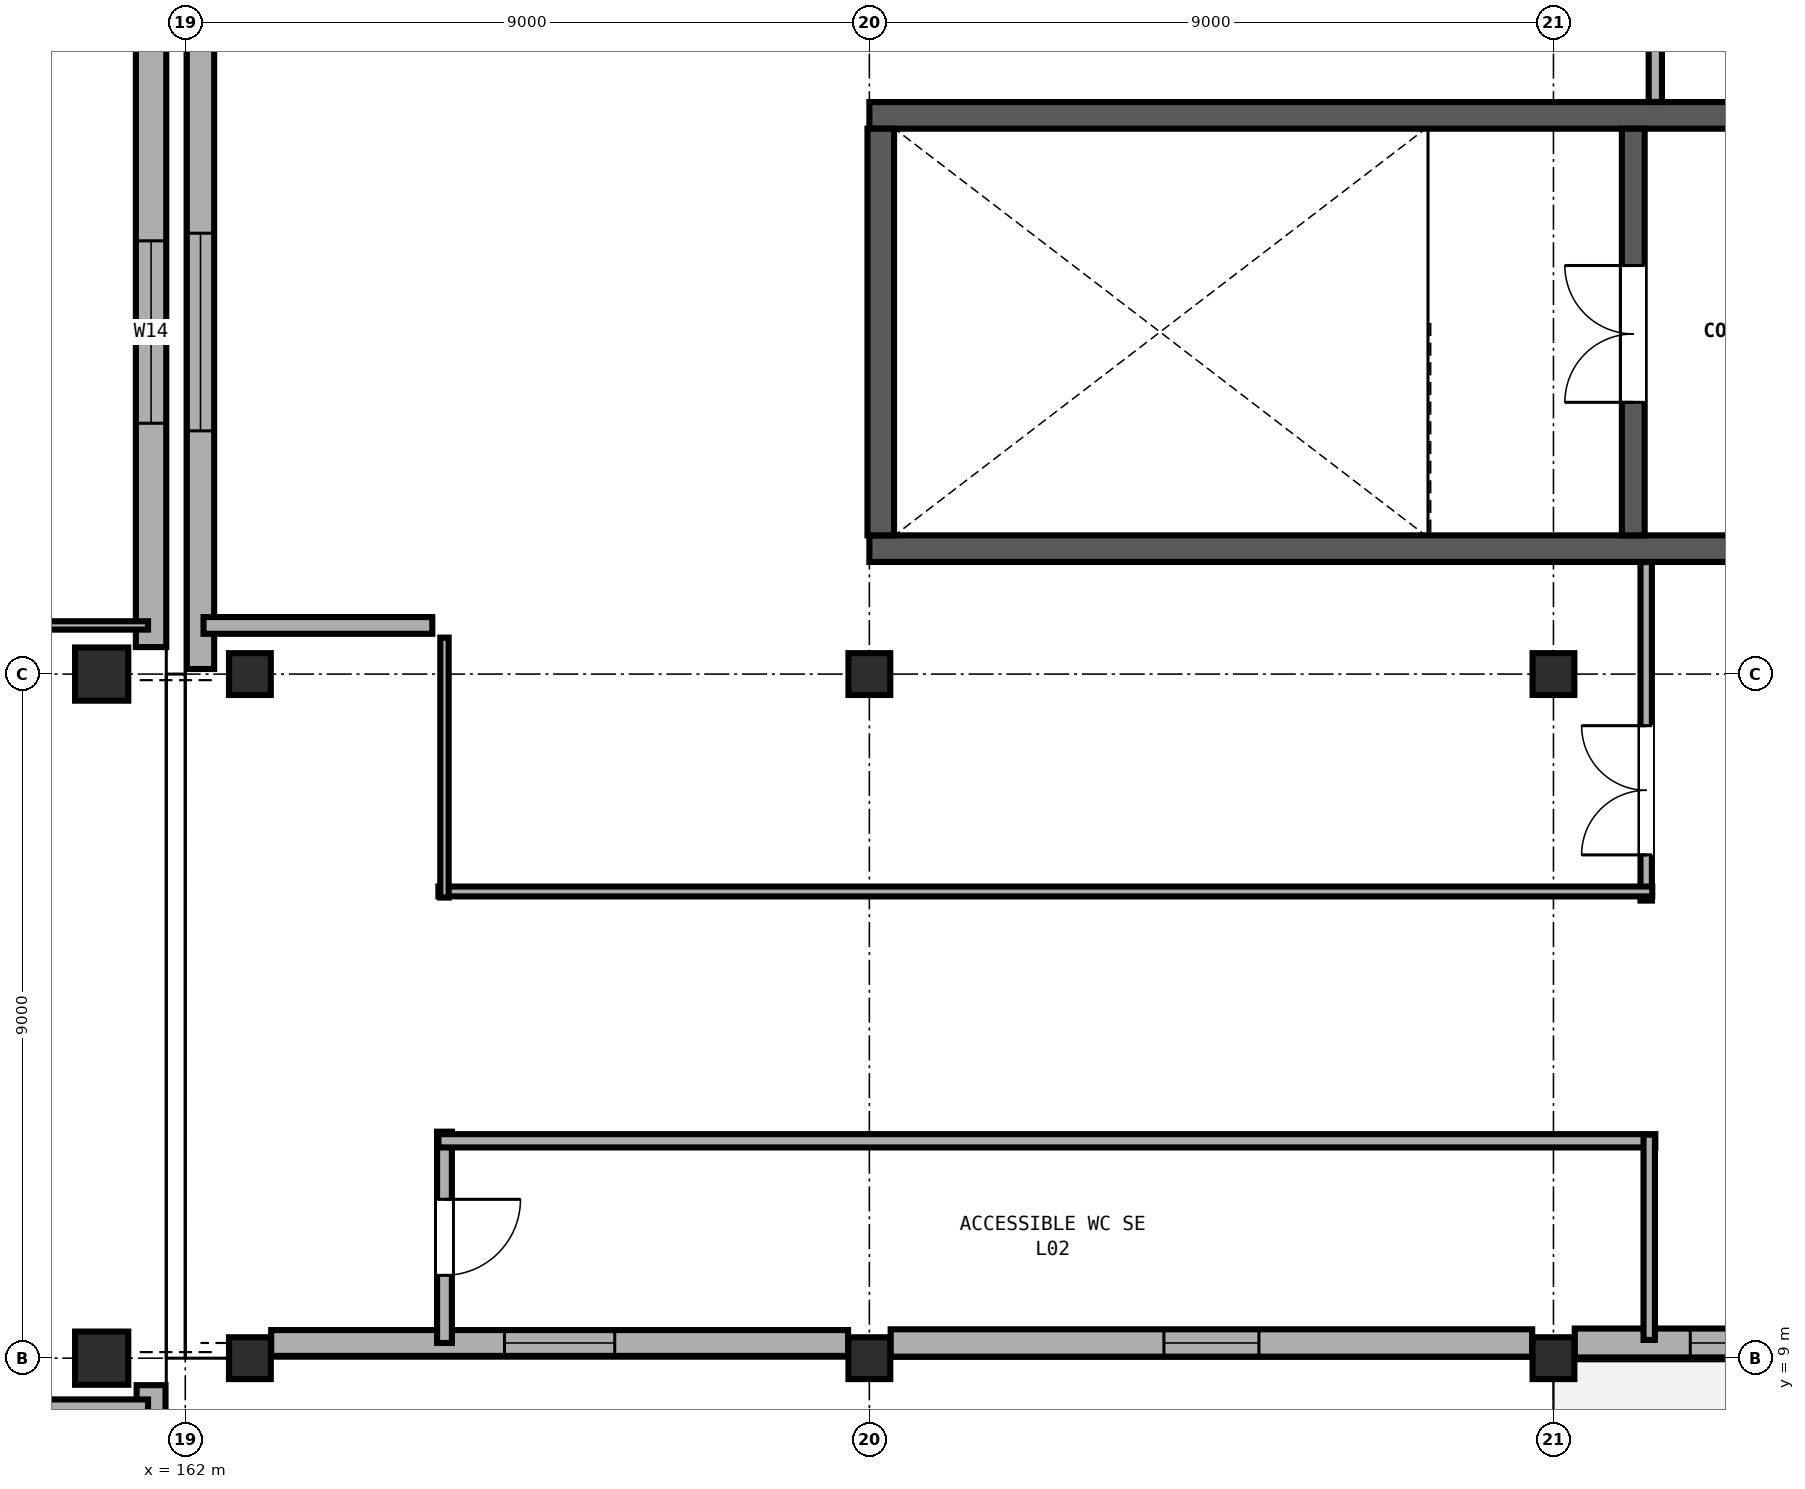
"""IFC4 building model, lengths in metres.
Left out: names, types, materials, properties, quantities, classifications, styles, units other than length and angle.
Written with IfcOpenShell. Run it as: python <this file> out.ifc"""

import sys

from ifc_helpers import new_model, si_unit, direction, frame, frame_2d, origin, origin_2d, place, context, subcontext, project, spatial, rectangle, extrude, element, fill, save


model = new_model("IFC4")
c1 = context("Model", 3, precision=1e-05, world=origin(), true_north=direction((0.0, 1.0)))
c2 = subcontext(c1, "Body", "Model", "MODEL_VIEW")
j1 = project(units=[si_unit("LENGTHUNIT", "METRE"), si_unit("PLANEANGLEUNIT", "RADIAN")], contexts=[c1])
p1 = place(None, origin())
s1 = spatial("IfcSite", under=j1, at=p1, CompositionType="ELEMENT")
p2 = place(p1, origin())
s2 = spatial("IfcBuilding", under=s1, at=p2, CompositionType="ELEMENT")
p3 = place(p2, frame((0.0, 0.0, 9.6)))
s3 = spatial("IfcBuildingStorey", under=s2, at=p3, CompositionType="ELEMENT", Elevation=9.6)
for number, where, z_axis, x_axis in (
    (1, (160.9, 9.0, 0.0), (0.0, 0.0, 1.0), (1.0, 0.0, 0.0)),
    (2, (160.9, 18.0, 0.0), (0.0, 0.0, 1.0), (1.0, 0.0, 0.0)),
):
    element("IfcColumn", number, at=place(p3, frame(where, z_axis=z_axis, x_axis=x_axis)), inside=s3, PredefinedType="COLUMN", context=c2, shape_type="SweptSolid", body=[
        extrude(rectangle(XDim=0.7, YDim=0.7, at=origin_2d()), origin(), (0.0, 0.0, 1.0), 4.8),
    ])
for number, where, z_axis, x_axis in (
    (3, (162.85, 9.0, 0.0), (0.0, 0.0, 1.0), (1.0, 0.0, 0.0)),
    (4, (162.85, 18.0, 0.0), (0.0, 0.0, 1.0), (1.0, 0.0, 0.0)),
    (5, (171.0, 9.0, 0.0), (0.0, 0.0, 1.0), (1.0, 0.0, 0.0)),
    (6, (171.0, 18.0, 0.0), (0.0, 0.0, 1.0), (1.0, 0.0, 0.0)),
    (7, (180.0, 9.0, 0.0), (0.0, 0.0, 1.0), (1.0, 0.0, 0.0)),
    (8, (180.0, 18.0, 0.0), (0.0, 0.0, 1.0), (1.0, 0.0, 0.0)),
):
    element("IfcColumn", number, at=place(p3, frame(where, z_axis=z_axis, x_axis=x_axis)), inside=s3, PredefinedType="COLUMN", context=c2, shape_type="SweptSolid", body=[
        extrude(rectangle(XDim=0.55, YDim=0.55, at=origin_2d()), origin(), (0.0, 0.0, 1.0), 4.8),
    ])
p4 = place(p3, frame((171.0, 19.65, 0.0), z_axis=(0.0, 0.0, 1.0), x_axis=(1.0, 0.0, 0.0)))
e9 = element("IfcWall", 9, at=p4, inside=s3, PredefinedType="SHEAR", context=c2, shape_type="SweptSolid", body=[
    extrude(rectangle(XDim=18.0, YDim=0.35, at=frame_2d((9.0, 0.0))), origin(), (0.0, 0.0, 1.0), 4.555),
])
p5 = place(p4, frame((11.4, 0.0, 0.0)))
e10 = element("IfcOpeningElement", 10, at=p5, cuts=e9, PredefinedType="OPENING", context=c2, shape_type="SweptSolid", body=[
    extrude(rectangle(XDim=1.9, YDim=2.25, at=frame_2d((0.95, 1.125))), frame((0.0, 0.185, 0.0), z_axis=(0.0, -1.0, 0.0), x_axis=(1.0, 0.0, 0.0)), (0.0, 0.0, 1.0), 0.37),
])
p6 = place(p3, frame((189.0, 25.35, 0.0), z_axis=(0.0, 0.0, 1.0), x_axis=(-1.0, 0.0, 0.0)))
e11 = element("IfcWall", 11, at=p6, inside=s3, PredefinedType="SHEAR", context=c2, shape_type="SweptSolid", body=[
    extrude(rectangle(XDim=18.0, YDim=0.35, at=frame_2d((9.0, 0.0))), origin(), (0.0, 0.0, 1.0), 4.555),
])
p7 = place(p3, frame((171.15, 25.175, 0.0), z_axis=(0.0, 0.0, 1.0), x_axis=(0.0, -1.0, 0.0)))
e12 = element("IfcWall", 12, at=p7, inside=s3, PredefinedType="SHEAR", context=c2, shape_type="SweptSolid", body=[
    extrude(rectangle(XDim=5.35, YDim=0.35, at=frame_2d((2.675, 0.0))), origin(), (0.0, 0.0, 1.0), 4.555),
])
p8 = place(p3, frame((181.05, 19.825, 0.0), z_axis=(0.0, 0.0, 1.0), x_axis=(0.0, 1.0, 0.0)))
e13 = element("IfcWall", 13, at=p8, inside=s3, PredefinedType="SHEAR", context=c2, shape_type="SweptSolid", body=[
    extrude(rectangle(XDim=5.35, YDim=0.3, at=frame_2d((2.675, 0.0))), origin(), (0.0, 0.0, 1.0), 4.555),
])
p9 = place(p8, frame((1.75, 0.0, 0.0)))
e14 = element("IfcOpeningElement", 14, at=p9, cuts=e13, PredefinedType="OPENING", context=c2, shape_type="SweptSolid", body=[
    extrude(rectangle(XDim=1.8, YDim=2.25, at=frame_2d((0.9, 1.125))), frame((0.0, 0.16, 0.0), z_axis=(0.0, -1.0, 0.0), x_axis=(1.0, 0.0, 0.0)), (0.0, 0.0, 1.0), 0.32),
])
p10 = place(p3, frame((161.55, 26.645, 0.0), z_axis=(0.0, 0.0, 1.0), x_axis=(0.0, -1.0, 0.0)))
e15 = element("IfcWall", 15, at=p10, inside=s3, PredefinedType="SOLIDWALL", context=c2, shape_type="SweptSolid", body=[
    extrude(rectangle(XDim=8.29, YDim=0.4, at=frame_2d((4.145, 0.0))), origin(), (0.0, 0.0, 1.0), 3.58),
])
p11 = place(p10, frame((2.945, 0.0, 0.9)))
e16 = element("IfcOpeningElement", 16, at=p11, cuts=e15, PredefinedType="OPENING", context=c2, shape_type="SweptSolid", body=[
    extrude(rectangle(XDim=2.4, YDim=2.05, at=frame_2d((1.2, 1.025))), frame((0.0, 0.21, 0.0), z_axis=(0.0, -1.0, 0.0), x_axis=(1.0, 0.0, 0.0)), (0.0, 0.0, 1.0), 0.42),
])
p12 = place(p3, frame((161.55, 8.645, 0.0), z_axis=(0.0, 0.0, 1.0), x_axis=(0.0, -1.0, 0.0)))
e17 = element("IfcWall", 17, at=p12, inside=s3, PredefinedType="SOLIDWALL", context=c2, shape_type="SweptSolid", body=[
    extrude(rectangle(XDim=1.645, YDim=0.38, at=frame_2d((0.823, 0.0))), origin(), (0.0, 0.0, 1.0), 3.58),
])
p13 = place(p3, frame((162.2, 18.067, 0.0), z_axis=(0.0, 0.0, 1.0), x_axis=(0.0, 1.0, 0.0)))
e18 = element("IfcWall", 18, at=p13, inside=s3, PredefinedType="SOLIDWALL", context=c2, shape_type="SweptSolid", body=[
    extrude(rectangle(XDim=8.867, YDim=0.36, at=frame_2d((4.433, 0.0))), origin(), (0.0, 0.0, 1.0), 3.58),
])
p14 = place(p13, frame((3.133, 0.0, 0.9)))
e19 = element("IfcOpeningElement", 19, at=p14, cuts=e18, PredefinedType="OPENING", context=c2, shape_type="SweptSolid", body=[
    extrude(rectangle(XDim=2.6, YDim=2.15, at=frame_2d((1.3, 1.075))), frame((0.0, 0.19, 0.0), z_axis=(0.0, -1.0, 0.0), x_axis=(1.0, 0.0, 0.0)), (0.0, 0.0, 1.0), 0.38),
])
p15 = place(p3, frame((188.72, 9.2, 0.0), z_axis=(0.0, 0.0, 1.0), x_axis=(-1.0, 0.0, 0.0)))
e20 = element("IfcWall", 20, at=p15, inside=s3, PredefinedType="SOLIDWALL", context=c2, shape_type="SweptSolid", body=[
    extrude(rectangle(XDim=8.44, YDim=0.38, at=frame_2d((4.22, 0.0))), origin(), (0.0, 0.0, 1.0), 3.58),
])
p16 = place(p15, frame((3.52, 0.0, 0.9)))
e21 = element("IfcOpeningElement", 21, at=p16, cuts=e20, PredefinedType="OPENING", context=c2, shape_type="SweptSolid", body=[
    extrude(rectangle(XDim=3.4, YDim=1.95, at=frame_2d((1.7, 0.975))), frame((0.0, 0.2, 0.0), z_axis=(0.0, -1.0, 0.0), x_axis=(1.0, 0.0, 0.0)), (0.0, 0.0, 1.0), 0.4),
])
p17 = place(p3, frame((179.72, 9.2, 0.0), z_axis=(0.0, 0.0, 1.0), x_axis=(-1.0, 0.0, 0.0)))
e22 = element("IfcWall", 22, at=p17, inside=s3, PredefinedType="SOLIDWALL", context=c2, shape_type="SweptSolid", body=[
    extrude(rectangle(XDim=8.44, YDim=0.36, at=frame_2d((4.22, 0.0))), origin(), (0.0, 0.0, 1.0), 3.58),
])
p18 = place(p17, frame((3.595, 0.0, 0.9)))
e23 = element("IfcOpeningElement", 23, at=p18, cuts=e22, PredefinedType="OPENING", context=c2, shape_type="SweptSolid", body=[
    extrude(rectangle(XDim=1.25, YDim=1.8, at=frame_2d((0.625, 0.9))), frame((0.0, 0.19, 0.0), z_axis=(0.0, -1.0, 0.0), x_axis=(1.0, 0.0, 0.0)), (0.0, 0.0, 1.0), 0.38),
])
p19 = place(p3, frame((170.72, 9.2, 0.0), z_axis=(0.0, 0.0, 1.0), x_axis=(-1.0, 0.0, 0.0)))
e24 = element("IfcWall", 24, at=p19, inside=s3, PredefinedType="SOLIDWALL", context=c2, shape_type="SweptSolid", body=[
    extrude(rectangle(XDim=7.59, YDim=0.34, at=frame_2d((3.795, 0.0))), origin(), (0.0, 0.0, 1.0), 3.58),
])
p20 = place(p19, frame((3.07, 0.0, 0.9)))
e25 = element("IfcOpeningElement", 25, at=p20, cuts=e24, PredefinedType="OPENING", context=c2, shape_type="SweptSolid", body=[
    extrude(rectangle(XDim=1.45, YDim=1.85, at=frame_2d((0.725, 0.925))), frame((0.0, 0.18, 0.0), z_axis=(0.0, -1.0, 0.0), x_axis=(1.0, 0.0, 0.0)), (0.0, 0.0, 1.0), 0.36),
])
p21 = place(p3, frame((161.51, 18.64, 0.0), z_axis=(0.0, 0.0, 1.0), x_axis=(-1.0, 0.0, 0.0)))
e26 = element("IfcWall", 26, at=p21, inside=s3, PredefinedType="PARTITIONING", context=c2, shape_type="SweptSolid", body=[
    extrude(rectangle(XDim=3.36, YDim=0.11, at=frame_2d((1.68, 0.0))), origin(), (0.0, 0.0, 1.0), 3.56),
])
p22 = place(p3, frame((158.15, 8.36, 0.0), z_axis=(0.0, 0.0, 1.0), x_axis=(1.0, 0.0, 0.0)))
e27 = element("IfcWall", 27, at=p22, inside=s3, PredefinedType="PARTITIONING", context=c2, shape_type="SweptSolid", body=[
    extrude(rectangle(XDim=3.36, YDim=0.195, at=frame_2d((1.68, 0.0))), origin(), (0.0, 0.0, 1.0), 3.56),
])
p23 = place(p3, frame((181.34, 25.527, 0.0), z_axis=(0.0, 0.0, 1.0), x_axis=(0.0, 1.0, 0.0)))
e28 = element("IfcWall", 28, at=p23, inside=s3, PredefinedType="PARTITIONING", context=c2, shape_type="SweptSolid", body=[
    extrude(rectangle(XDim=10.233, YDim=0.175, at=frame_2d((5.116, 0.0))), origin(), (0.0, 0.0, 1.0), 3.56),
])
p24 = place(p3, frame((181.22, 15.02, 0.0), z_axis=(0.0, 0.0, 1.0), x_axis=(0.0, 1.0, 0.0)))
e29 = element("IfcWall", 29, at=p24, inside=s3, PredefinedType="PARTITIONING", context=c2, shape_type="SweptSolid", body=[
    extrude(rectangle(XDim=4.453, YDim=0.15, at=frame_2d((2.227, 0.0))), origin(), (0.0, 0.0, 1.0), 3.56),
])
p25 = place(p24, frame((0.601, 0.0, 0.0)))
e30 = element("IfcOpeningElement", 30, at=p25, cuts=e29, PredefinedType="OPENING", context=c2, shape_type="SweptSolid", body=[
    extrude(rectangle(XDim=1.7, YDim=2.2, at=frame_2d((0.85, 1.1))), frame((0.0, 0.085, 0.0), z_axis=(0.0, -1.0, 0.0), x_axis=(1.0, 0.0, 0.0)), (0.0, 0.0, 1.0), 0.17),
])
p26 = place(p3, frame((181.3, 15.14, 0.0), z_axis=(0.0, 0.0, 1.0), x_axis=(-1.0, 0.0, 0.0)))
e31 = element("IfcWall", 31, at=p26, inside=s3, PredefinedType="PARTITIONING", context=c2, shape_type="SweptSolid", body=[
    extrude(rectangle(XDim=15.97, YDim=0.13, at=frame_2d((7.985, 0.0))), origin(), (0.0, 0.0, 1.0), 3.56),
])
p27 = place(p3, frame((165.41, 15.06, 0.0), z_axis=(0.0, 0.0, 1.0), x_axis=(0.0, 1.0, 0.0)))
e32 = element("IfcWall", 32, at=p27, inside=s3, PredefinedType="PARTITIONING", context=c2, shape_type="SweptSolid", body=[
    extrude(rectangle(XDim=3.42, YDim=0.11, at=frame_2d((1.71, 0.0))), origin(), (0.0, 0.0, 1.0), 3.56),
])
p28 = place(p3, frame((165.25, 18.64, 0.0), z_axis=(0.0, 0.0, 1.0), x_axis=(-1.0, 0.0, 0.0)))
e33 = element("IfcWall", 33, at=p28, inside=s3, PredefinedType="PARTITIONING", context=c2, shape_type="SweptSolid", body=[
    extrude(rectangle(XDim=3.01, YDim=0.22, at=frame_2d((1.505, 0.0))), origin(), (0.0, 0.0, 1.0), 3.56),
])
p29 = place(p3, frame((165.41, 11.98, 0.0), z_axis=(0.0, 0.0, 1.0), x_axis=(0.0, -1.0, 0.0)))
e34 = element("IfcWall", 34, at=p29, inside=s3, PredefinedType="PARTITIONING", context=c2, shape_type="SweptSolid", body=[
    extrude(rectangle(XDim=2.78, YDim=0.195, at=frame_2d((1.39, 0.0))), origin(), (0.0, 0.0, 1.0), 3.56),
])
p30 = place(p29, frame((0.89, 0.0, 0.0)))
e35 = element("IfcOpeningElement", 35, at=p30, cuts=e34, PredefinedType="OPENING", context=c2, shape_type="SweptSolid", body=[
    extrude(rectangle(XDim=1.0, YDim=2.1, at=frame_2d((0.5, 1.05))), frame((0.0, 0.107, 0.0), z_axis=(0.0, -1.0, 0.0), x_axis=(1.0, 0.0, 0.0)), (0.0, 0.0, 1.0), 0.215),
])
p31 = place(p3, frame((165.33, 11.86, 0.0), z_axis=(0.0, 0.0, 1.0), x_axis=(1.0, 0.0, 0.0)))
e36 = element("IfcWall", 36, at=p31, inside=s3, PredefinedType="PARTITIONING", context=c2, shape_type="SweptSolid", body=[
    extrude(rectangle(XDim=16.01, YDim=0.175, at=frame_2d((8.005, 0.0))), origin(), (0.0, 0.0, 1.0), 3.56),
])
p32 = place(p3, frame((181.26, 11.94, 0.0), z_axis=(0.0, 0.0, 1.0), x_axis=(0.0, -1.0, 0.0)))
e37 = element("IfcWall", 37, at=p32, inside=s3, PredefinedType="PARTITIONING", context=c2, shape_type="SweptSolid", body=[
    extrude(rectangle(XDim=2.7, YDim=0.15, at=frame_2d((1.35, 0.0))), origin(), (0.0, 0.0, 1.0), 3.56),
])
p33 = place(p11, origin())
e38 = element("IfcWindow", 38, at=p33, inside=s3, PartitioningType="DOUBLE_PANEL_VERTICAL", PredefinedType="WINDOW", context=c2, shape_type="SweptSolid", body=[
    extrude(rectangle(XDim=2.4, YDim=2.05, at=frame_2d((1.2, 1.025))), frame((0.0, 0.03, 0.0), z_axis=(0.0, -1.0, 0.0), x_axis=(1.0, 0.0, 0.0)), (0.0, 0.0, 1.0), 0.06),
])
fill(e16, e38)
p34 = place(p14, origin())
e39 = element("IfcWindow", 39, at=p34, inside=s3, PartitioningType="DOUBLE_PANEL_VERTICAL", PredefinedType="WINDOW", context=c2, shape_type="SweptSolid", body=[
    extrude(rectangle(XDim=2.6, YDim=2.15, at=frame_2d((1.3, 1.075))), frame((0.0, 0.03, 0.0), z_axis=(0.0, -1.0, 0.0), x_axis=(1.0, 0.0, 0.0)), (0.0, 0.0, 1.0), 0.06),
])
fill(e19, e39)
p35 = place(p16, origin())
e40 = element("IfcWindow", 40, at=p35, inside=s3, PartitioningType="DOUBLE_PANEL_VERTICAL", PredefinedType="WINDOW", context=c2, shape_type="SweptSolid", body=[
    extrude(rectangle(XDim=3.4, YDim=1.95, at=frame_2d((1.7, 0.975))), frame((0.0, 0.03, 0.0), z_axis=(0.0, -1.0, 0.0), x_axis=(1.0, 0.0, 0.0)), (0.0, 0.0, 1.0), 0.06),
])
fill(e21, e40)
p36 = place(p18, origin())
e41 = element("IfcWindow", 41, at=p36, inside=s3, PartitioningType="SINGLE_PANEL", PredefinedType="WINDOW", context=c2, shape_type="SweptSolid", body=[
    extrude(rectangle(XDim=1.25, YDim=1.8, at=frame_2d((0.625, 0.9))), frame((0.0, 0.03, 0.0), z_axis=(0.0, -1.0, 0.0), x_axis=(1.0, 0.0, 0.0)), (0.0, 0.0, 1.0), 0.06),
])
fill(e23, e41)
p37 = place(p20, origin())
e42 = element("IfcWindow", 42, at=p37, inside=s3, PartitioningType="SINGLE_PANEL", PredefinedType="WINDOW", context=c2, shape_type="SweptSolid", body=[
    extrude(rectangle(XDim=1.45, YDim=1.85, at=frame_2d((0.725, 0.925))), frame((0.0, 0.03, 0.0), z_axis=(0.0, -1.0, 0.0), x_axis=(1.0, 0.0, 0.0)), (0.0, 0.0, 1.0), 0.06),
])
fill(e25, e42)
p38 = place(p9, origin())
e43 = element("IfcDoor", 43, at=p38, inside=s3, OperationType="DOUBLE_DOOR_SINGLE_SWING", PredefinedType="DOOR", context=c2, shape_type="SweptSolid", body=[
    extrude(rectangle(XDim=1.8, YDim=2.25, at=frame_2d((0.9, 1.125))), frame((0.0, 0.025, 0.0), z_axis=(0.0, -1.0, 0.0), x_axis=(1.0, 0.0, 0.0)), (0.0, 0.0, 1.0), 0.05),
])
fill(e14, e43)
p39 = place(p25, origin())
e44 = element("IfcDoor", 44, at=p39, inside=s3, OperationType="DOUBLE_DOOR_SINGLE_SWING", PredefinedType="DOOR", context=c2, shape_type="SweptSolid", body=[
    extrude(rectangle(XDim=1.7, YDim=2.2, at=frame_2d((0.85, 1.1))), frame((0.0, 0.025, 0.0), z_axis=(0.0, -1.0, 0.0), x_axis=(1.0, 0.0, 0.0)), (0.0, 0.0, 1.0), 0.05),
])
fill(e30, e44)
p40 = place(p30, origin())
e45 = element("IfcDoor", 45, at=p40, inside=s3, OperationType="SINGLE_SWING_LEFT", PredefinedType="DOOR", context=c2, shape_type="SweptSolid", body=[
    extrude(rectangle(XDim=1.0, YDim=2.1, at=frame_2d((0.5, 1.05))), frame((0.0, 0.025, 0.0), z_axis=(0.0, -1.0, 0.0), x_axis=(1.0, 0.0, 0.0)), (0.0, 0.0, 1.0), 0.05),
])
fill(e35, e45)
save(model, sys.argv[1])
